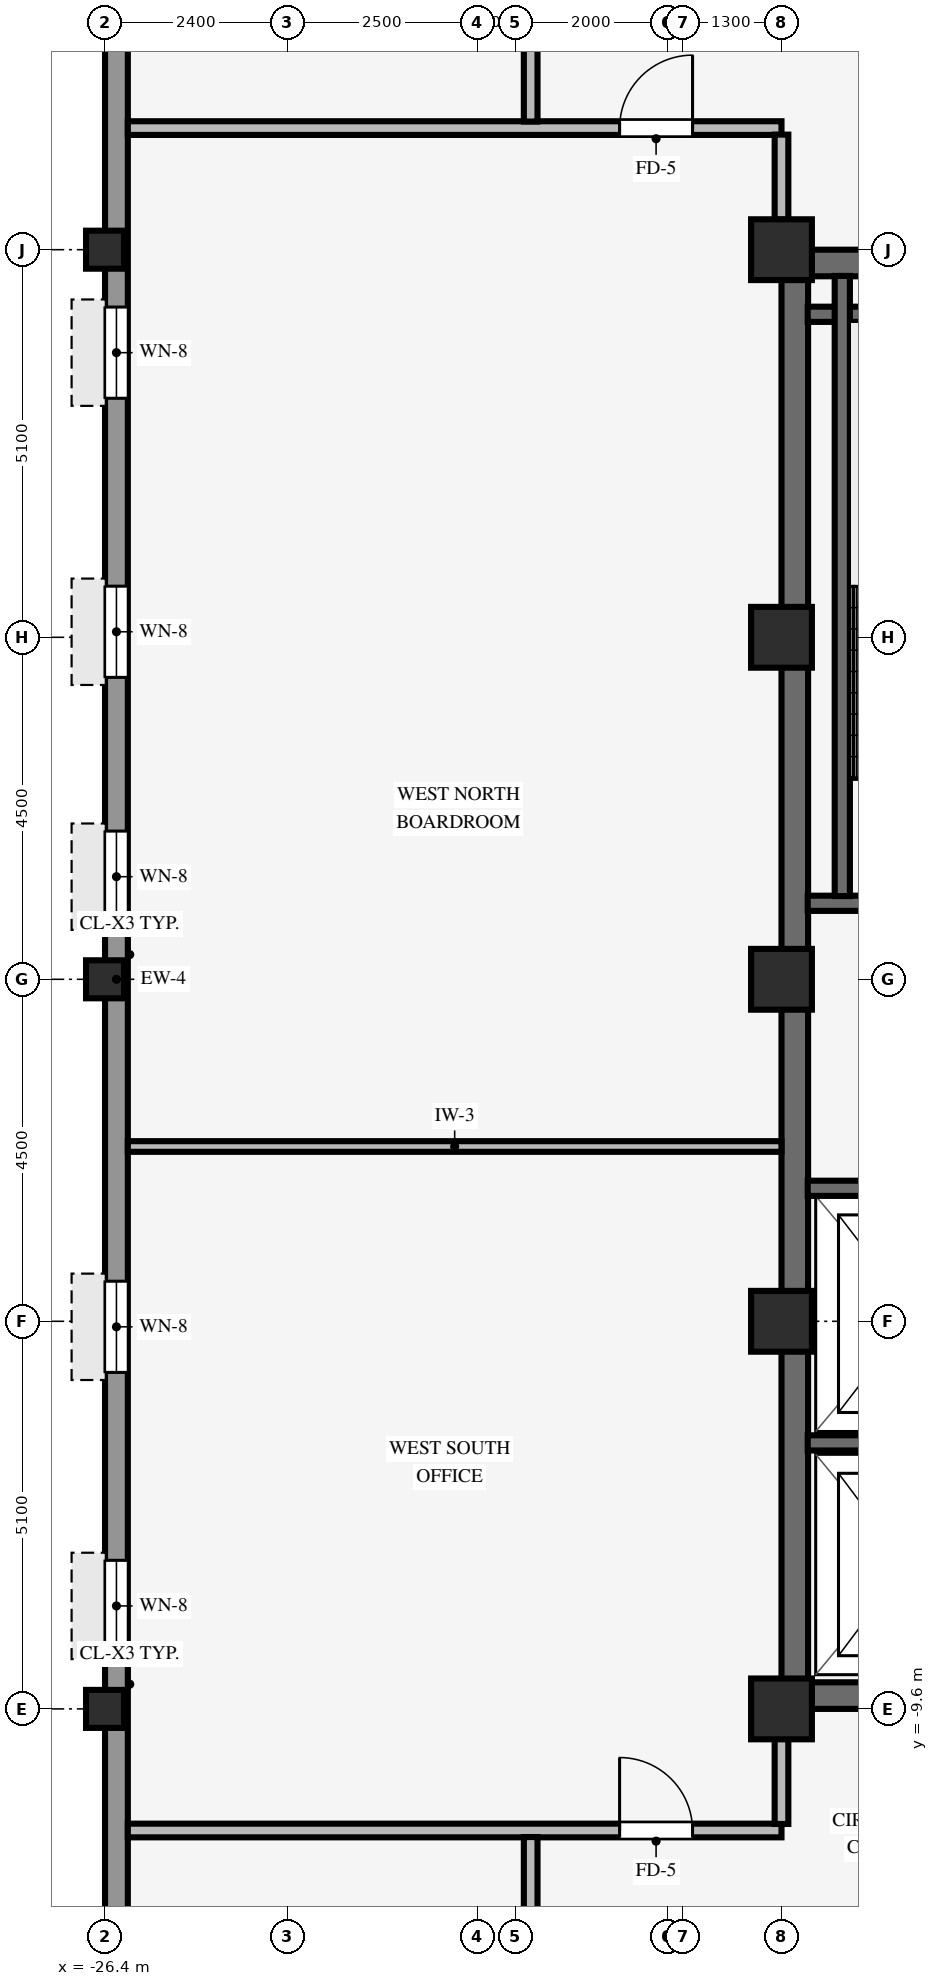
"""IFC4 building model, lengths in metres.
Left out: names, types, materials, properties, quantities, classifications, styles, units other than length and angle.
Written with IfcOpenShell. Run it as: python <this file> out.ifc"""

import sys

from ifc_helpers import new_model, si_unit, direction, frame, frame_2d, origin, origin_2d, place, context, subcontext, project, spatial, rectangle, hollow_rectangle, extrude, source, transform, mapped, element, fill, save


model = new_model("IFC4")
c1 = context("Model", 3, precision=1e-05, world=origin(), true_north=direction((0.0, 1.0)))
c2 = subcontext(c1, "Body", "Model", "MODEL_VIEW")
j1 = project(units=[si_unit("LENGTHUNIT", "METRE"), si_unit("PLANEANGLEUNIT", "RADIAN")], contexts=[c1])
p1 = place(None, origin())
s1 = spatial("IfcSite", under=j1, at=p1, CompositionType="ELEMENT")
p2 = place(p1, origin())
s2 = spatial("IfcBuilding", under=s1, at=p2, CompositionType="ELEMENT")
p3 = place(p2, frame((0.0, 0.0, 231.05)))
s3 = spatial("IfcBuildingStorey", under=s2, at=p3, CompositionType="ELEMENT", Elevation=231.05)
for number, where, z_axis, x_axis in (
    (1, (-17.5, -9.425, 0.0), (0.0, 0.0, 1.0), (1.0, 0.0, 0.0)),
    (2, (-17.5, 9.425, 0.0), (0.0, 0.0, 1.0), (1.0, 0.0, 0.0)),
):
    element("IfcWall", number, at=place(p3, frame(where, z_axis=z_axis, x_axis=x_axis)), inside=s3, PredefinedType="SHEAR", context=c2, shape_type="SweptSolid", body=[
        extrude(rectangle(XDim=8.5, YDim=0.35, at=frame_2d((4.25, 0.0))), origin(), (0.0, 0.0, 1.0), 3.37),
    ])
p4 = place(p3, frame((-17.325, -9.255, 0.0), z_axis=(0.0, 0.0, 1.0), x_axis=(0.0, 1.0, 0.0)))
e3 = element("IfcWall", 3, at=p4, inside=s3, PredefinedType="SHEAR", context=c2, shape_type="SweptSolid", body=[
    extrude(rectangle(XDim=18.51, YDim=0.35, at=frame_2d((9.255, 0.0))), origin(), (0.0, 0.0, 1.0), 3.37),
])
for number, where, z_axis, x_axis in (
    (4, (-17.5, -9.6, 0.0), (0.0, 0.0, 1.0), (1.0, 0.0, 0.0)),
    (5, (-17.5, -4.5, 0.0), (0.0, 0.0, 1.0), (1.0, 0.0, 0.0)),
    (6, (-17.5, 4.5, 0.0), (0.0, 0.0, 1.0), (1.0, 0.0, 0.0)),
    (7, (-17.5, 9.6, 0.0), (0.0, 0.0, 1.0), (1.0, 0.0, 0.0)),
    (8, (-17.5, 0.0, 0.0), (0.0, 0.0, 1.0), (1.0, 0.0, 0.0)),
):
    element("IfcColumn", number, at=place(p3, frame(where, z_axis=z_axis, x_axis=x_axis)), inside=s3, PredefinedType="COLUMN", context=c2, shape_type="SweptSolid", body=[
        extrude(rectangle(XDim=0.8, YDim=0.8, at=origin_2d()), origin(), (0.0, 0.0, 1.0), 3.37),
    ])
for number, where, z_axis, x_axis in (
    (9, (-26.4, -9.6, 0.0), (0.0, 0.0, 1.0), (1.0, 0.0, 0.0)),
    (10, (-26.4, 0.0, 0.0), (0.0, 0.0, 1.0), (1.0, 0.0, 0.0)),
    (11, (-26.4, 9.6, 0.0), (0.0, 0.0, 1.0), (1.0, 0.0, 0.0)),
):
    element("IfcColumn", number, at=place(p3, frame(where, z_axis=z_axis, x_axis=x_axis)), inside=s3, PredefinedType="COLUMN", context=c2, shape_type="SweptSolid", body=[
        extrude(hollow_rectangle(XDim=0.5, YDim=0.5, WallThickness=0.032, InnerFilletRadius=0.032, OuterFilletRadius=0.064, at=origin_2d()), origin(), (0.0, 0.0, 1.0), 3.37),
    ])
p5 = place(p3, frame((-26.25, -17.004, 0.0), z_axis=(0.0, 0.0, 1.0), x_axis=(0.0, 1.0, 0.0)))
e12 = element("IfcWall", 12, at=p5, inside=s3, PredefinedType="STANDARD", context=c2, shape_type="SweptSolid", body=[
    extrude(rectangle(XDim=34.008, YDim=0.3, at=frame_2d((17.004, 0.0))), origin(), (0.0, 0.0, 1.0), 2.705),
])
p6 = place(p5, frame((2.686, 0.0, 0.8)))
e13 = element("IfcOpeningElement", 13, at=p6, cuts=e12, PredefinedType="OPENING", context=c2, shape_type="SweptSolid", body=[
    extrude(rectangle(XDim=1.2, YDim=1.48, at=frame_2d((0.6, 0.74))), frame((0.0, 0.16, 0.0), z_axis=(0.0, -1.0, 0.0), x_axis=(1.0, 0.0, 0.0)), (0.0, 0.0, 1.0), 0.32),
])
p7 = place(p5, frame((8.159, 0.0, 0.8)))
e14 = element("IfcOpeningElement", 14, at=p7, cuts=e12, PredefinedType="OPENING", context=c2, shape_type="SweptSolid", body=[
    extrude(rectangle(XDim=1.2, YDim=1.48, at=frame_2d((0.6, 0.74))), frame((0.0, 0.16, 0.0), z_axis=(0.0, -1.0, 0.0), x_axis=(1.0, 0.0, 0.0)), (0.0, 0.0, 1.0), 0.32),
])
p8 = place(p5, frame((11.831, 0.0, 0.8)))
e15 = element("IfcOpeningElement", 15, at=p8, cuts=e12, PredefinedType="OPENING", context=c2, shape_type="SweptSolid", body=[
    extrude(rectangle(XDim=1.2, YDim=1.48, at=frame_2d((0.6, 0.74))), frame((0.0, 0.16, 0.0), z_axis=(0.0, -1.0, 0.0), x_axis=(1.0, 0.0, 0.0)), (0.0, 0.0, 1.0), 0.32),
])
p9 = place(p5, frame((17.754, 0.0, 0.8)))
e16 = element("IfcOpeningElement", 16, at=p9, cuts=e12, PredefinedType="OPENING", context=c2, shape_type="SweptSolid", body=[
    extrude(rectangle(XDim=1.2, YDim=1.48, at=frame_2d((0.6, 0.74))), frame((0.0, 0.16, 0.0), z_axis=(0.0, -1.0, 0.0), x_axis=(1.0, 0.0, 0.0)), (0.0, 0.0, 1.0), 0.32),
])
p10 = place(p5, frame((20.977, 0.0, 0.8)))
e17 = element("IfcOpeningElement", 17, at=p10, cuts=e12, PredefinedType="OPENING", context=c2, shape_type="SweptSolid", body=[
    extrude(rectangle(XDim=1.2, YDim=1.48, at=frame_2d((0.6, 0.74))), frame((0.0, 0.16, 0.0), z_axis=(0.0, -1.0, 0.0), x_axis=(1.0, 0.0, 0.0)), (0.0, 0.0, 1.0), 0.32),
])
p11 = place(p5, frame((24.649, 0.0, 0.8)))
e18 = element("IfcOpeningElement", 18, at=p11, cuts=e12, PredefinedType="OPENING", context=c2, shape_type="SweptSolid", body=[
    extrude(rectangle(XDim=1.2, YDim=1.48, at=frame_2d((0.6, 0.74))), frame((0.0, 0.16, 0.0), z_axis=(0.0, -1.0, 0.0), x_axis=(1.0, 0.0, 0.0)), (0.0, 0.0, 1.0), 0.32),
])
p12 = place(p5, frame((30.122, 0.0, 0.8)))
e19 = element("IfcOpeningElement", 19, at=p12, cuts=e12, PredefinedType="OPENING", context=c2, shape_type="SweptSolid", body=[
    extrude(rectangle(XDim=1.2, YDim=1.48, at=frame_2d((0.6, 0.74))), frame((0.0, 0.16, 0.0), z_axis=(0.0, -1.0, 0.0), x_axis=(1.0, 0.0, 0.0)), (0.0, 0.0, 1.0), 0.32),
])
for number, where, z_axis, x_axis in (
    (20, (-17.155, 1.0, 0.0), (0.0, 0.0, 1.0), (1.0, 0.0, 0.0)),
    (21, (-17.155, 8.75, 0.0), (0.0, 0.0, 1.0), (1.0, 0.0, 0.0)),
):
    element("IfcWall", number, at=place(p3, frame(where, z_axis=z_axis, x_axis=x_axis)), inside=s3, PredefinedType="SHEAR", context=c2, shape_type="SweptSolid", body=[
        extrude(rectangle(XDim=3.62, YDim=0.2, at=frame_2d((1.81, 0.0))), origin(), (0.0, 0.0, 1.0), 3.37),
    ])
p13 = place(p3, frame((-16.7, 1.095, 0.0), z_axis=(0.0, 0.0, 1.0), x_axis=(0.0, 1.0, 0.0)))
e22 = element("IfcWall", 22, at=p13, inside=s3, PredefinedType="SHEAR", context=c2, shape_type="SweptSolid", body=[
    extrude(rectangle(XDim=8.16, YDim=0.2, at=frame_2d((4.08, 0.0))), origin(), (0.0, 0.0, 1.0), 3.37),
])
p14 = place(p3, frame((-17.155, -6.1, 0.0), z_axis=(0.0, 0.0, 1.0), x_axis=(1.0, 0.0, 0.0)))
e23 = element("IfcWall", 23, at=p14, inside=s3, PredefinedType="SHEAR", context=c2, shape_type="SweptSolid", body=[
    extrude(rectangle(XDim=2.905, YDim=0.2, at=frame_2d((1.453, 0.0))), origin(), (0.0, 0.0, 1.0), 3.37),
])
p15 = place(p3, frame((-17.155, -2.75, 0.0), z_axis=(0.0, 0.0, 1.0), x_axis=(1.0, 0.0, 0.0)))
e24 = element("IfcWall", 24, at=p15, inside=s3, PredefinedType="SHEAR", context=c2, shape_type="SweptSolid", body=[
    extrude(rectangle(XDim=2.71, YDim=0.2, at=frame_2d((1.355, 0.0))), origin(), (0.0, 0.0, 1.0), 3.37),
])
p16 = place(p3, frame((-26.1, -11.2, 0.0), z_axis=(0.0, 0.0, 1.0), x_axis=(1.0, 0.0, 0.0)))
e25 = element("IfcWall", 25, at=p16, inside=s3, PredefinedType="PARTITIONING", context=c2, shape_type="SweptSolid", body=[
    extrude(rectangle(XDim=8.6, YDim=0.18, at=frame_2d((4.3, 0.0))), origin(), (0.0, 0.0, 1.0), 3.36),
])
p17 = place(p16, frame((6.47, 0.0, 0.0)))
e26 = element("IfcOpeningElement", 26, at=p17, cuts=e25, PredefinedType="OPENING", context=c2, shape_type="SweptSolid", body=[
    extrude(rectangle(XDim=0.96, YDim=2.1, at=frame_2d((0.48, 1.05))), frame((0.0, 0.1, 0.0), z_axis=(0.0, -1.0, 0.0), x_axis=(1.0, 0.0, 0.0)), (0.0, 0.0, 1.0), 0.2),
])
p18 = place(p3, frame((-26.1, -2.2, 0.0), z_axis=(0.0, 0.0, 1.0), x_axis=(1.0, 0.0, 0.0)))
e27 = element("IfcWall", 27, at=p18, inside=s3, PredefinedType="PARTITIONING", context=c2, shape_type="SweptSolid", body=[
    extrude(rectangle(XDim=8.6, YDim=0.14, at=frame_2d((4.3, 0.0))), origin(), (0.0, 0.0, 1.0), 3.36),
])
p19 = place(p3, frame((-26.1, 11.2, 0.0), z_axis=(0.0, 0.0, 1.0), x_axis=(1.0, 0.0, 0.0)))
e28 = element("IfcWall", 28, at=p19, inside=s3, PredefinedType="PARTITIONING", context=c2, shape_type="SweptSolid", body=[
    extrude(rectangle(XDim=8.6, YDim=0.18, at=frame_2d((4.3, 0.0))), origin(), (0.0, 0.0, 1.0), 3.36),
])
p20 = place(p19, frame((6.47, 0.0, 0.0)))
e29 = element("IfcOpeningElement", 29, at=p20, cuts=e28, PredefinedType="OPENING", context=c2, shape_type="SweptSolid", body=[
    extrude(rectangle(XDim=0.96, YDim=2.1, at=frame_2d((0.48, 1.05))), frame((0.0, 0.1, 0.0), z_axis=(0.0, -1.0, 0.0), x_axis=(1.0, 0.0, 0.0)), (0.0, 0.0, 1.0), 0.2),
])
for number, where, z_axis, x_axis in (
    (30, (-20.8, -13.514, 0.0), (0.0, 0.0, 1.0), (0.0, 1.0, 0.0)),
    (31, (-20.8, 11.286, 0.0), (0.0, 0.0, 1.0), (0.0, 1.0, 0.0)),
):
    element("IfcWall", number, at=place(p3, frame(where, z_axis=z_axis, x_axis=x_axis)), inside=s3, PredefinedType="PARTITIONING", context=c2, shape_type="SweptSolid", body=[
        extrude(rectangle(XDim=2.228, YDim=0.18, at=frame_2d((1.114, 0.0))), origin(), (0.0, 0.0, 1.0), 3.36),
    ])
for number, where, z_axis, x_axis in (
    (32, (-17.5, -11.114, 0.0), (0.0, 0.0, 1.0), (0.0, 1.0, 0.0)),
    (33, (-17.5, 9.996, 0.0), (0.0, 0.0, 1.0), (0.0, 1.0, 0.0)),
):
    element("IfcWall", number, at=place(p3, frame(where, z_axis=z_axis, x_axis=x_axis)), inside=s3, PredefinedType="PARTITIONING", context=c2, shape_type="SweptSolid", body=[
        extrude(rectangle(XDim=1.118, YDim=0.18, at=frame_2d((0.559, 0.0))), origin(), (0.0, 0.0, 1.0), 2.892),
    ])
m1 = source(origin(), c2, "Body", "SweptSolid", [
    extrude(rectangle(XDim=1.2, YDim=1.48, at=frame_2d((0.6, 0.74))), frame((0.0, 0.03, 0.0), z_axis=(0.0, -1.0, 0.0), x_axis=(1.0, 0.0, 0.0)), (0.0, 0.0, 1.0), 0.06),
])
p21 = place(p7, origin())
e34 = element("IfcWindow", 34, at=p21, inside=s3, PartitioningType="SINGLE_PANEL", PredefinedType="WINDOW", context=c2, shape_type="MappedRepresentation", body=[
    mapped(m1, transform((0.0, 0.0, 0.0), scale=1.0)),
])
fill(e14, e34)
p22 = place(p8, origin())
e35 = element("IfcWindow", 35, at=p22, inside=s3, PartitioningType="SINGLE_PANEL", PredefinedType="WINDOW", context=c2, shape_type="MappedRepresentation", body=[
    mapped(m1, transform((0.0, 0.0, 0.0), scale=1.0)),
])
fill(e15, e35)
p23 = place(p9, origin())
e36 = element("IfcWindow", 36, at=p23, inside=s3, PartitioningType="SINGLE_PANEL", PredefinedType="WINDOW", context=c2, shape_type="MappedRepresentation", body=[
    mapped(m1, transform((0.0, 0.0, 0.0), scale=1.0)),
])
fill(e16, e36)
p24 = place(p10, origin())
e37 = element("IfcWindow", 37, at=p24, inside=s3, PartitioningType="SINGLE_PANEL", PredefinedType="WINDOW", context=c2, shape_type="MappedRepresentation", body=[
    mapped(m1, transform((0.0, 0.0, 0.0), scale=1.0)),
])
fill(e17, e37)
p25 = place(p11, origin())
e38 = element("IfcWindow", 38, at=p25, inside=s3, PartitioningType="SINGLE_PANEL", PredefinedType="WINDOW", context=c2, shape_type="MappedRepresentation", body=[
    mapped(m1, transform((0.0, 0.0, 0.0), scale=1.0)),
])
fill(e18, e38)
m2 = source(origin(), c2, "Body", "SweptSolid", [
    extrude(rectangle(XDim=0.96, YDim=2.1, at=frame_2d((0.48, 1.05))), frame((0.0, 0.025, 0.0), z_axis=(0.0, -1.0, 0.0), x_axis=(1.0, 0.0, 0.0)), (0.0, 0.0, 1.0), 0.05),
])
p26 = place(p17, origin())
e39 = element("IfcDoor", 39, at=p26, inside=s3, OperationType="SINGLE_SWING_LEFT", PredefinedType="DOOR", context=c2, shape_type="MappedRepresentation", body=[
    mapped(m2, transform((0.0, 0.0, 0.0), scale=1.0)),
])
fill(e26, e39)
p27 = place(p20, origin())
e40 = element("IfcDoor", 40, at=p27, inside=s3, OperationType="SINGLE_SWING_RIGHT", PredefinedType="DOOR", context=c2, shape_type="MappedRepresentation", body=[
    mapped(m2, transform((0.0, 0.0, 0.0), scale=1.0)),
])
fill(e29, e40)
save(model, sys.argv[1])
